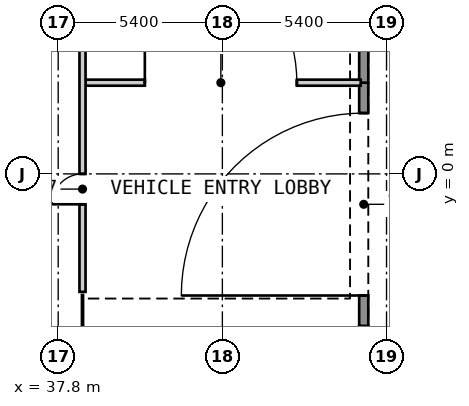
"""IFC4 building model, lengths in metres.
Left out: names, types, materials, properties, quantities, classifications, styles, units other than length and angle.
Written with IfcOpenShell. Run it as: python <this file> out.ifc"""

import sys

from ifc_helpers import new_model, si_unit, direction, frame, frame_2d, origin, place, context, subcontext, project, spatial, rectangle, extrude, element, fill, save


model = new_model("IFC4")
c1 = context("Model", 3, precision=1e-05, world=origin(), true_north=direction((0.0, 1.0)))
c2 = subcontext(c1, "Body", "Model", "MODEL_VIEW")
j1 = project(units=[si_unit("LENGTHUNIT", "METRE"), si_unit("PLANEANGLEUNIT", "RADIAN")], contexts=[c1])
p1 = place(None, origin())
s1 = spatial("IfcSite", under=j1, at=p1, CompositionType="ELEMENT")
p2 = place(p1, origin())
s2 = spatial("IfcBuilding", under=s1, at=p2, CompositionType="ELEMENT")
p3 = place(p2, origin())
s3 = spatial("IfcBuildingStorey", under=s2, at=p3, CompositionType="ELEMENT", Elevation=0.0)
p4 = place(p3, frame((47.85, -5.0, 0.0), z_axis=(0.0, 0.0, 1.0), x_axis=(0.0, 1.0, 0.0)))
e1 = element("IfcWall", 1, at=p4, inside=s3, PredefinedType="SOLIDWALL", context=c2, shape_type="SweptSolid", body=[
    extrude(rectangle(XDim=8.0, YDim=0.3, at=frame_2d((4.0, 0.0))), origin(), (0.0, 0.0, 1.0), 4.55),
])
p5 = place(p4, frame((1.0, 0.0, 0.0)))
e2 = element("IfcOpeningElement", 2, at=p5, cuts=e1, PredefinedType="OPENING", context=c2, shape_type="SweptSolid", body=[
    extrude(rectangle(XDim=6.0, YDim=4.2, at=frame_2d((3.0, 2.1))), frame((0.0, 0.16, 0.0), z_axis=(0.0, -1.0, 0.0), x_axis=(1.0, 0.0, 0.0)), (0.0, 0.0, 1.0), 0.32),
])
p6 = place(p3, frame((47.85, 3.0, 0.0), z_axis=(0.0, 0.0, 1.0), x_axis=(0.0, 1.0, 0.0)))
e3 = element("IfcWall", 3, at=p6, inside=s3, PredefinedType="SOLIDWALL", context=c2, shape_type="SweptSolid", body=[
    extrude(rectangle(XDim=20.4, YDim=0.3, at=frame_2d((10.2, 0.0))), origin(), (0.0, 0.0, 1.0), 4.55),
])
p7 = place(p6, frame((1.9, 0.0, 0.9)))
e4 = element("IfcOpeningElement", 4, at=p7, cuts=e3, PredefinedType="OPENING", context=c2, shape_type="SweptSolid", body=[
    extrude(rectangle(XDim=1.8, YDim=2.4, at=frame_2d((0.9, 1.2))), frame((0.0, 0.16, 0.0), z_axis=(0.0, -1.0, 0.0), x_axis=(1.0, 0.0, 0.0)), (0.0, 0.0, 1.0), 0.32),
])
p8 = place(p6, frame((7.3, 0.0, 0.9)))
e5 = element("IfcOpeningElement", 5, at=p8, cuts=e3, PredefinedType="OPENING", context=c2, shape_type="SweptSolid", body=[
    extrude(rectangle(XDim=1.8, YDim=2.4, at=frame_2d((0.9, 1.2))), frame((0.0, 0.16, 0.0), z_axis=(0.0, -1.0, 0.0), x_axis=(1.0, 0.0, 0.0)), (0.0, 0.0, 1.0), 0.32),
])
p9 = place(p6, frame((12.7, 0.0, 0.9)))
e6 = element("IfcOpeningElement", 6, at=p9, cuts=e3, PredefinedType="OPENING", context=c2, shape_type="SweptSolid", body=[
    extrude(rectangle(XDim=1.8, YDim=2.4, at=frame_2d((0.9, 1.2))), frame((0.0, 0.16, 0.0), z_axis=(0.0, -1.0, 0.0), x_axis=(1.0, 0.0, 0.0)), (0.0, 0.0, 1.0), 0.32),
])
p10 = place(p3, frame((38.7, 3.0, 0.0), z_axis=(0.0, 0.0, 1.0), x_axis=(1.0, 0.0, 0.0)))
e7 = element("IfcWall", 7, at=p10, inside=s3, PredefinedType="PARTITIONING", context=c2, shape_type="SweptSolid", body=[
    extrude(rectangle(XDim=9.05, YDim=0.2, at=frame_2d((4.525, 0.0))), origin(), (0.0, 0.0, 1.0), 4.55),
])
p11 = place(p10, frame((1.95, 0.0, 0.0)))
e8 = element("IfcOpeningElement", 8, at=p11, cuts=e7, PredefinedType="OPENING", context=c2, shape_type="SweptSolid", body=[
    extrude(rectangle(XDim=5.0, YDim=2.1, at=frame_2d((2.5, 1.05))), frame((0.0, 0.11, 0.0), z_axis=(0.0, -1.0, 0.0), x_axis=(1.0, 0.0, 0.0)), (0.0, 0.0, 1.0), 0.22),
])
p12 = place(p3, frame((38.6, -3.88, 0.0), z_axis=(0.0, 0.0, 1.0), x_axis=(0.0, 1.0, 0.0)))
e9 = element("IfcWall", 9, at=p12, inside=s3, PredefinedType="PARTITIONING", context=c2, shape_type="SweptSolid", body=[
    extrude(rectangle(XDim=37.68, YDim=0.2, at=frame_2d((18.84, 0.0))), origin(), (0.0, 0.0, 1.0), 4.55),
])
p13 = place(p12, frame((35.328, 0.0, 0.0), z_axis=(0.0, 0.0, 1.0), x_axis=(-1.0, 0.0, 0.0)))
e10 = element("IfcOpeningElement", 10, at=p13, cuts=e9, PredefinedType="OPENING", context=c2, shape_type="SweptSolid", body=[
    extrude(rectangle(XDim=1.0, YDim=2.1, at=frame_2d((0.5, 1.05))), frame((0.0, 0.11, 0.0), z_axis=(0.0, -1.0, 0.0), x_axis=(1.0, 0.0, 0.0)), (0.0, 0.0, 1.0), 0.22),
])
p14 = place(p12, frame((27.88, 0.0, 0.0), z_axis=(0.0, 0.0, 1.0), x_axis=(-1.0, 0.0, 0.0)))
e11 = element("IfcOpeningElement", 11, at=p14, cuts=e9, PredefinedType="OPENING", context=c2, shape_type="SweptSolid", body=[
    extrude(rectangle(XDim=1.0, YDim=2.1, at=frame_2d((0.5, 1.05))), frame((0.0, 0.11, 0.0), z_axis=(0.0, -1.0, 0.0), x_axis=(1.0, 0.0, 0.0)), (0.0, 0.0, 1.0), 0.22),
])
p15 = place(p12, frame((14.38, 0.0, 0.0)))
e12 = element("IfcOpeningElement", 12, at=p15, cuts=e9, PredefinedType="OPENING", context=c2, shape_type="SweptSolid", body=[
    extrude(rectangle(XDim=1.0, YDim=2.1, at=frame_2d((0.5, 1.05))), frame((0.0, 0.11, 0.0), z_axis=(0.0, -1.0, 0.0), x_axis=(1.0, 0.0, 0.0)), (0.0, 0.0, 1.0), 0.22),
])
p16 = place(p12, frame((2.88, 0.0, 0.0)))
e13 = element("IfcOpeningElement", 13, at=p16, cuts=e9, PredefinedType="OPENING", context=c2, shape_type="SweptSolid", body=[
    extrude(rectangle(XDim=1.0, YDim=2.1, at=frame_2d((0.5, 1.05))), frame((0.0, 0.11, 0.0), z_axis=(0.0, -1.0, 0.0), x_axis=(1.0, 0.0, 0.0)), (0.0, 0.0, 1.0), 0.22),
])
p17 = place(p5, origin())
e14 = element("IfcDoor", 14, at=p17, inside=s3, OperationType="ROLLINGUP", PredefinedType="GATE", context=c2, shape_type="SweptSolid", body=[
    extrude(rectangle(XDim=6.0, YDim=4.2, at=frame_2d((3.0, 2.1))), frame((0.0, 0.025, 0.0), z_axis=(0.0, -1.0, 0.0), x_axis=(1.0, 0.0, 0.0)), (0.0, 0.0, 1.0), 0.05),
])
fill(e2, e14)
p18 = place(p16, origin())
e15 = element("IfcDoor", 15, at=p18, inside=s3, OperationType="SINGLE_SWING_LEFT", PredefinedType="DOOR", context=c2, shape_type="SweptSolid", body=[
    extrude(rectangle(XDim=1.0, YDim=2.1, at=frame_2d((0.5, 1.05))), frame((0.0, 0.025, 0.0), z_axis=(0.0, -1.0, 0.0), x_axis=(1.0, 0.0, 0.0)), (0.0, 0.0, 1.0), 0.05),
])
fill(e13, e15)
p19 = place(p11, origin())
e16 = element("IfcDoor", 16, at=p19, inside=s3, OperationType="ROLLINGUP", PredefinedType="DOOR", context=c2, shape_type="SweptSolid", body=[
    extrude(rectangle(XDim=5.0, YDim=2.1, at=frame_2d((2.5, 1.05))), frame((0.0, 0.025, 0.0), z_axis=(0.0, -1.0, 0.0), x_axis=(1.0, 0.0, 0.0)), (0.0, 0.0, 1.0), 0.05),
])
fill(e8, e16)
save(model, sys.argv[1])
